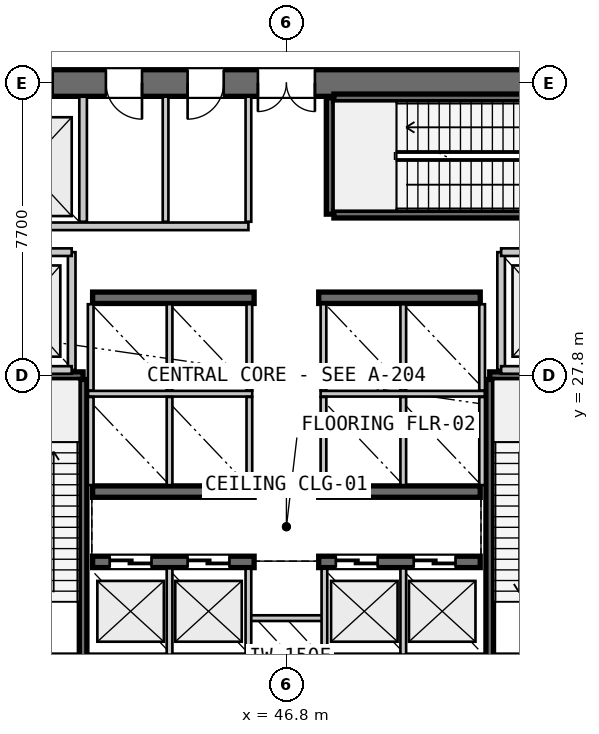
"""IFC4 building model, lengths in metres.
Left out: names, types, materials, properties, quantities, classifications, styles, units other than length and angle.
Written with IfcOpenShell. Run it as: python <this file> out.ifc"""

import sys

from ifc_helpers import new_model, si_unit, direction, frame, frame_2d, origin, place, context, subcontext, project, spatial, rectangle, extrude, source, transform, mapped, element, fill, save


model = new_model("IFC4")
c1 = context("Model", 3, precision=1e-05, world=origin(), true_north=direction((0.0, 1.0)))
c2 = subcontext(c1, "Body", "Model", "MODEL_VIEW")
j1 = project(units=[si_unit("LENGTHUNIT", "METRE"), si_unit("PLANEANGLEUNIT", "RADIAN")], contexts=[c1])
p1 = place(None, origin())
s1 = spatial("IfcSite", under=j1, at=p1, CompositionType="ELEMENT")
p2 = place(p1, origin())
s2 = spatial("IfcBuilding", under=s1, at=p2, CompositionType="ELEMENT")
p3 = place(p2, frame((0.0, 0.0, 24.0)))
s3 = spatial("IfcBuildingStorey", under=s2, at=p3, CompositionType="ELEMENT", Elevation=24.0)
p4 = place(p3, frame((38.0, 20.1, 0.0), z_axis=(0.0, 0.0, 1.0), x_axis=(1.0, 0.0, 0.0)))
e1 = element("IfcWall", 1, at=p4, inside=s3, PredefinedType="SHEAR", context=c2, shape_type="SweptSolid", body=[
    extrude(rectangle(XDim=17.6, YDim=0.7, at=frame_2d((8.8, 0.0))), origin(), (0.0, 0.0, 1.0), 5.12),
])
p5 = place(p4, frame((1.4, 0.0, 0.0)))
e2 = element("IfcOpeningElement", 2, at=p5, cuts=e1, PredefinedType="OPENING", context=c2, shape_type="SweptSolid", body=[
    extrude(rectangle(XDim=1.05, YDim=2.15, at=frame_2d((0.525, 1.075))), frame((0.0, 0.36, 0.0), z_axis=(0.0, -1.0, 0.0), x_axis=(1.0, 0.0, 0.0)), (0.0, 0.0, 1.0), 0.72),
])
p6 = place(p4, frame((15.15, 0.0, 0.0)))
e3 = element("IfcOpeningElement", 3, at=p6, cuts=e1, PredefinedType="OPENING", context=c2, shape_type="SweptSolid", body=[
    extrude(rectangle(XDim=1.05, YDim=2.15, at=frame_2d((0.525, 1.075))), frame((0.0, 0.36, 0.0), z_axis=(0.0, -1.0, 0.0), x_axis=(1.0, 0.0, 0.0)), (0.0, 0.0, 1.0), 0.72),
])
p7 = place(p3, frame((55.6, 35.5, 0.0), z_axis=(0.0, 0.0, 1.0), x_axis=(-1.0, 0.0, 0.0)))
e4 = element("IfcWall", 4, at=p7, inside=s3, PredefinedType="SHEAR", context=c2, shape_type="SweptSolid", body=[
    extrude(rectangle(XDim=17.6, YDim=0.7, at=frame_2d((8.8, 0.0))), origin(), (0.0, 0.0, 1.0), 5.12),
])
p8 = place(p7, frame((8.05, 0.0, 0.0)))
e5 = element("IfcOpeningElement", 5, at=p8, cuts=e4, PredefinedType="OPENING", context=c2, shape_type="SweptSolid", body=[
    extrude(rectangle(XDim=1.5, YDim=2.2, at=frame_2d((0.75, 1.1))), frame((0.0, 0.36, 0.0), z_axis=(0.0, -1.0, 0.0), x_axis=(1.0, 0.0, 0.0)), (0.0, 0.0, 1.0), 0.72),
])
p9 = place(p7, frame((14.95, 0.0, 0.0)))
e6 = element("IfcOpeningElement", 6, at=p9, cuts=e4, PredefinedType="OPENING", context=c2, shape_type="SweptSolid", body=[
    extrude(rectangle(XDim=1.4, YDim=2.3, at=frame_2d((0.7, 1.15))), frame((0.0, 0.36, 0.0), z_axis=(0.0, -1.0, 0.0), x_axis=(1.0, 0.0, 0.0)), (0.0, 0.0, 1.0), 0.72),
])
p10 = place(p7, frame((12.6, 0.0, 0.0)))
e7 = element("IfcOpeningElement", 7, at=p10, cuts=e4, PredefinedType="OPENING", context=c2, shape_type="SweptSolid", body=[
    extrude(rectangle(XDim=0.95, YDim=2.15, at=frame_2d((0.475, 1.075))), frame((0.0, 0.36, 0.0), z_axis=(0.0, -1.0, 0.0), x_axis=(1.0, 0.0, 0.0)), (0.0, 0.0, 1.0), 0.72),
])
p11 = place(p7, frame((10.45, 0.0, 0.0)))
e8 = element("IfcOpeningElement", 8, at=p11, cuts=e4, PredefinedType="OPENING", context=c2, shape_type="SweptSolid", body=[
    extrude(rectangle(XDim=0.95, YDim=2.15, at=frame_2d((0.475, 1.075))), frame((0.0, 0.36, 0.0), z_axis=(0.0, -1.0, 0.0), x_axis=(1.0, 0.0, 0.0)), (0.0, 0.0, 1.0), 0.72),
])
p12 = place(p3, frame((41.7, 22.9, 0.0), z_axis=(0.0, 0.0, 1.0), x_axis=(1.0, 0.0, 0.0)))
e9 = element("IfcWall", 9, at=p12, inside=s3, PredefinedType="SHEAR", context=c2, shape_type="SweptSolid", body=[
    extrude(rectangle(XDim=4.25, YDim=0.3, at=frame_2d((2.125, 0.0))), origin(), (0.0, 0.0, 1.0), 5.12),
])
p13 = place(p12, frame((0.45, 0.0, 0.0)))
e10 = element("IfcOpeningElement", 10, at=p13, cuts=e9, PredefinedType="OPENING", context=c2, shape_type="SweptSolid", body=[
    extrude(rectangle(XDim=1.1, YDim=2.2, at=frame_2d((0.55, 1.1))), frame((0.0, 0.16, 0.0), z_axis=(0.0, -1.0, 0.0), x_axis=(1.0, 0.0, 0.0)), (0.0, 0.0, 1.0), 0.32),
])
p14 = place(p12, frame((2.5, 0.0, 0.0)))
e11 = element("IfcOpeningElement", 11, at=p14, cuts=e9, PredefinedType="OPENING", context=c2, shape_type="SweptSolid", body=[
    extrude(rectangle(XDim=1.1, YDim=2.2, at=frame_2d((0.55, 1.1))), frame((0.0, 0.16, 0.0), z_axis=(0.0, -1.0, 0.0), x_axis=(1.0, 0.0, 0.0)), (0.0, 0.0, 1.0), 0.32),
])
p15 = place(p3, frame((47.65, 22.9, 0.0), z_axis=(0.0, 0.0, 1.0), x_axis=(1.0, 0.0, 0.0)))
e12 = element("IfcWall", 12, at=p15, inside=s3, PredefinedType="SHEAR", context=c2, shape_type="SweptSolid", body=[
    extrude(rectangle(XDim=4.25, YDim=0.3, at=frame_2d((2.125, 0.0))), origin(), (0.0, 0.0, 1.0), 5.12),
])
p16 = place(p15, frame((0.45, 0.0, 0.0)))
e13 = element("IfcOpeningElement", 13, at=p16, cuts=e12, PredefinedType="OPENING", context=c2, shape_type="SweptSolid", body=[
    extrude(rectangle(XDim=1.1, YDim=2.2, at=frame_2d((0.55, 1.1))), frame((0.0, 0.16, 0.0), z_axis=(0.0, -1.0, 0.0), x_axis=(1.0, 0.0, 0.0)), (0.0, 0.0, 1.0), 0.32),
])
p17 = place(p15, frame((2.5, 0.0, 0.0)))
e14 = element("IfcOpeningElement", 14, at=p17, cuts=e12, PredefinedType="OPENING", context=c2, shape_type="SweptSolid", body=[
    extrude(rectangle(XDim=1.1, YDim=2.2, at=frame_2d((0.55, 1.1))), frame((0.0, 0.16, 0.0), z_axis=(0.0, -1.0, 0.0), x_axis=(1.0, 0.0, 0.0)), (0.0, 0.0, 1.0), 0.32),
])
for number, where, z_axis, x_axis in (
    (15, (41.7, 24.75, 0.0), (0.0, 0.0, 1.0), (1.0, 0.0, 0.0)),
    (16, (47.65, 24.75, 0.0), (0.0, 0.0, 1.0), (1.0, 0.0, 0.0)),
    (17, (41.7, 29.85, 0.0), (0.0, 0.0, 1.0), (1.0, 0.0, 0.0)),
    (18, (47.65, 29.85, 0.0), (0.0, 0.0, 1.0), (1.0, 0.0, 0.0)),
):
    element("IfcWall", number, at=place(p3, frame(where, z_axis=z_axis, x_axis=x_axis)), inside=s3, PredefinedType="SHEAR", context=c2, shape_type="SweptSolid", body=[
        extrude(rectangle(XDim=4.25, YDim=0.3, at=frame_2d((2.125, 0.0))), origin(), (0.0, 0.0, 1.0), 5.12),
    ])
p18 = place(p3, frame((38.39, 27.8, 0.0), z_axis=(0.0, 0.0, 1.0), x_axis=(1.0, 0.0, 0.0)))
e19 = element("IfcWall", 19, at=p18, inside=s3, PredefinedType="SHEAR", context=c2, shape_type="SweptSolid", body=[
    extrude(rectangle(XDim=3.06, YDim=0.2, at=frame_2d((1.53, 0.0))), origin(), (0.0, 0.0, 1.0), 5.12),
])
p19 = place(p3, frame((41.45, 27.7, 0.0), z_axis=(0.0, 0.0, 1.0), x_axis=(0.0, -1.0, 0.0)))
e20 = element("IfcWall", 20, at=p19, inside=s3, PredefinedType="SHEAR", context=c2, shape_type="SweptSolid", body=[
    extrude(rectangle(XDim=7.35, YDim=0.2, at=frame_2d((3.675, 0.0))), origin(), (0.0, 0.0, 1.0), 5.12),
])
p20 = place(p3, frame((52.15, 27.8, 0.0), z_axis=(0.0, 0.0, 1.0), x_axis=(1.0, 0.0, 0.0)))
e21 = element("IfcWall", 21, at=p20, inside=s3, PredefinedType="SHEAR", context=c2, shape_type="SweptSolid", body=[
    extrude(rectangle(XDim=3.06, YDim=0.2, at=frame_2d((1.53, 0.0))), origin(), (0.0, 0.0, 1.0), 5.12),
])
p21 = place(p3, frame((52.15, 20.35, 0.0), z_axis=(0.0, 0.0, 1.0), x_axis=(0.0, 1.0, 0.0)))
e22 = element("IfcWall", 22, at=p21, inside=s3, PredefinedType="SHEAR", context=c2, shape_type="SweptSolid", body=[
    extrude(rectangle(XDim=7.35, YDim=0.2, at=frame_2d((3.675, 0.0))), origin(), (0.0, 0.0, 1.0), 5.12),
])
p22 = place(p3, frame((47.95, 32.05, 0.0), z_axis=(0.0, 0.0, 1.0), x_axis=(0.0, 1.0, 0.0)))
e23 = element("IfcWall", 23, at=p22, inside=s3, PredefinedType="SHEAR", context=c2, shape_type="SweptSolid", body=[
    extrude(rectangle(XDim=3.06, YDim=0.2, at=frame_2d((1.53, 0.0))), origin(), (0.0, 0.0, 1.0), 5.12),
])
for number, where, z_axis, x_axis in (
    (24, (48.05, 35.11, 0.0), (0.0, 0.0, 1.0), (1.0, 0.0, 0.0)),
    (25, (55.4, 32.05, 0.0), (0.0, 0.0, 1.0), (-1.0, 0.0, 0.0)),
):
    element("IfcWall", number, at=place(p3, frame(where, z_axis=z_axis, x_axis=x_axis)), inside=s3, PredefinedType="SHEAR", context=c2, shape_type="SweptSolid", body=[
        extrude(rectangle(XDim=7.35, YDim=0.2, at=frame_2d((3.675, 0.0))), origin(), (0.0, 0.0, 1.0), 5.12),
    ])
p23 = place(p3, frame((45.8, 21.42, 0.0), z_axis=(0.0, 0.0, 1.0), x_axis=(1.0, 0.0, 0.0)))
e26 = element("IfcWall", 26, at=p23, inside=s3, PredefinedType="PARTITIONING", context=c2, shape_type="SweptSolid", body=[
    extrude(rectangle(XDim=2.0, YDim=0.15, at=frame_2d((1.0, 0.0))), origin(), (0.0, 0.0, 1.0), 2.295),
])
for number, where, z_axis, x_axis in (
    (27, (45.8, 20.48, 0.0), (0.0, 0.0, 1.0), (0.0, 1.0, 0.0)),
    (28, (47.8, 20.48, 0.0), (0.0, 0.0, 1.0), (0.0, 1.0, 0.0)),
):
    element("IfcWall", number, at=place(p3, frame(where, z_axis=z_axis, x_axis=x_axis)), inside=s3, PredefinedType="PARTITIONING", context=c2, shape_type="SweptSolid", body=[
        extrude(rectangle(XDim=2.24, YDim=0.15, at=frame_2d((1.12, 0.0))), origin(), (0.0, 0.0, 1.0), 2.295),
    ])
p24 = place(p3, frame((41.15, 27.95, 0.0), z_axis=(0.0, 0.0, 1.0), x_axis=(0.0, 1.0, 0.0)))
e29 = element("IfcWall", 29, at=p24, inside=s3, PredefinedType="PARTITIONING", context=c2, shape_type="SweptSolid", body=[
    extrude(rectangle(XDim=3.1, YDim=0.2, at=frame_2d((1.55, 0.0))), origin(), (0.0, 0.0, 1.0), 2.295),
])
for number, where, z_axis, x_axis in (
    (30, (38.36, 27.95, 0.0), (0.0, 0.0, 1.0), (1.0, 0.0, 0.0)),
    (31, (38.36, 31.05, 0.0), (0.0, 0.0, 1.0), (1.0, 0.0, 0.0)),
):
    element("IfcWall", number, at=place(p3, frame(where, z_axis=z_axis, x_axis=x_axis)), inside=s3, PredefinedType="PARTITIONING", context=c2, shape_type="SweptSolid", body=[
        extrude(rectangle(XDim=2.79, YDim=0.2, at=frame_2d((1.395, 0.0))), origin(), (0.0, 0.0, 1.0), 2.295),
    ])
p25 = place(p3, frame((52.45, 27.95, 0.0), z_axis=(0.0, 0.0, 1.0), x_axis=(0.0, 1.0, 0.0)))
e32 = element("IfcWall", 32, at=p25, inside=s3, PredefinedType="PARTITIONING", context=c2, shape_type="SweptSolid", body=[
    extrude(rectangle(XDim=3.1, YDim=0.2, at=frame_2d((1.55, 0.0))), origin(), (0.0, 0.0, 1.0), 2.295),
])
for number, where, z_axis, x_axis in (
    (33, (52.45, 27.95, 0.0), (0.0, 0.0, 1.0), (1.0, 0.0, 0.0)),
    (34, (52.45, 31.05, 0.0), (0.0, 0.0, 1.0), (1.0, 0.0, 0.0)),
):
    element("IfcWall", number, at=place(p3, frame(where, z_axis=z_axis, x_axis=x_axis)), inside=s3, PredefinedType="PARTITIONING", context=c2, shape_type="SweptSolid", body=[
        extrude(rectangle(XDim=2.79, YDim=0.2, at=frame_2d((1.395, 0.0))), origin(), (0.0, 0.0, 1.0), 2.295),
    ])
for number, where, z_axis, x_axis in (
    (35, (43.725, 20.46, 0.0), (0.0, 0.0, 1.0), (0.0, 1.0, 0.0)),
    (36, (49.875, 20.46, 0.0), (0.0, 0.0, 1.0), (0.0, 1.0, 0.0)),
):
    element("IfcWall", number, at=place(p3, frame(where, z_axis=z_axis, x_axis=x_axis)), inside=s3, PredefinedType="PARTITIONING", context=c2, shape_type="SweptSolid", body=[
        extrude(rectangle(XDim=2.27, YDim=0.15, at=frame_2d((1.135, 0.0))), origin(), (0.0, 0.0, 1.0), 2.295),
    ])
p26 = place(p3, frame((41.58, 27.325, 0.0), z_axis=(0.0, 0.0, 1.0), x_axis=(1.0, 0.0, 0.0)))
e37 = element("IfcWall", 37, at=p26, inside=s3, PredefinedType="PARTITIONING", context=c2, shape_type="SweptSolid", body=[
    extrude(rectangle(XDim=4.32, YDim=0.15, at=frame_2d((2.16, 0.0))), origin(), (0.0, 0.0, 1.0), 2.295),
])
p27 = place(p3, frame((47.7, 27.325, 0.0), z_axis=(0.0, 0.0, 1.0), x_axis=(1.0, 0.0, 0.0)))
e38 = element("IfcWall", 38, at=p27, inside=s3, PredefinedType="PARTITIONING", context=c2, shape_type="SweptSolid", body=[
    extrude(rectangle(XDim=4.32, YDim=0.15, at=frame_2d((2.16, 0.0))), origin(), (0.0, 0.0, 1.0), 2.295),
])
for number, where, z_axis, x_axis in (
    (39, (41.65, 24.92, 0.0), (0.0, 0.0, 1.0), (0.0, 1.0, 0.0)),
    (40, (43.725, 24.92, 0.0), (0.0, 0.0, 1.0), (0.0, 1.0, 0.0)),
    (41, (45.825, 24.92, 0.0), (0.0, 0.0, 1.0), (0.0, 1.0, 0.0)),
    (42, (47.775, 24.92, 0.0), (0.0, 0.0, 1.0), (0.0, 1.0, 0.0)),
    (43, (49.875, 24.92, 0.0), (0.0, 0.0, 1.0), (0.0, 1.0, 0.0)),
    (44, (51.95, 24.92, 0.0), (0.0, 0.0, 1.0), (0.0, 1.0, 0.0)),
):
    element("IfcWall", number, at=place(p3, frame(where, z_axis=z_axis, x_axis=x_axis)), inside=s3, PredefinedType="PARTITIONING", context=c2, shape_type="SweptSolid", body=[
        extrude(rectangle(XDim=2.32, YDim=0.15, at=frame_2d((1.16, 0.0))), origin(), (0.0, 0.0, 1.0), 2.295),
    ])
for number, where, z_axis, x_axis in (
    (45, (41.65, 27.41, 0.0), (0.0, 0.0, 1.0), (0.0, 1.0, 0.0)),
    (46, (43.725, 27.41, 0.0), (0.0, 0.0, 1.0), (0.0, 1.0, 0.0)),
    (47, (45.825, 27.41, 0.0), (0.0, 0.0, 1.0), (0.0, 1.0, 0.0)),
    (48, (47.775, 27.41, 0.0), (0.0, 0.0, 1.0), (0.0, 1.0, 0.0)),
    (49, (49.875, 27.41, 0.0), (0.0, 0.0, 1.0), (0.0, 1.0, 0.0)),
    (50, (51.95, 27.41, 0.0), (0.0, 0.0, 1.0), (0.0, 1.0, 0.0)),
):
    element("IfcWall", number, at=place(p3, frame(where, z_axis=z_axis, x_axis=x_axis)), inside=s3, PredefinedType="PARTITIONING", context=c2, shape_type="SweptSolid", body=[
        extrude(rectangle(XDim=2.27, YDim=0.15, at=frame_2d((1.135, 0.0))), origin(), (0.0, 0.0, 1.0), 2.295),
    ])
p28 = place(p3, frame((41.45, 31.85, 0.0), z_axis=(0.0, 0.0, 1.0), x_axis=(0.0, 1.0, 0.0)))
e51 = element("IfcWall", 51, at=p28, inside=s3, PredefinedType="PARTITIONING", context=c2, shape_type="SweptSolid", body=[
    extrude(rectangle(XDim=3.29, YDim=0.2, at=frame_2d((1.645, 0.0))), origin(), (0.0, 0.0, 1.0), 2.295),
])
p29 = place(p3, frame((38.36, 31.73, 0.0), z_axis=(0.0, 0.0, 1.0), x_axis=(1.0, 0.0, 0.0)))
e52 = element("IfcWall", 52, at=p29, inside=s3, PredefinedType="PARTITIONING", context=c2, shape_type="SweptSolid", body=[
    extrude(rectangle(XDim=7.44, YDim=0.2, at=frame_2d((3.72, 0.0))), origin(), (0.0, 0.0, 1.0), 2.295),
])
p30 = place(p3, frame((45.8, 31.85, 0.0), z_axis=(0.0, 0.0, 1.0), x_axis=(0.0, 1.0, 0.0)))
e53 = element("IfcWall", 53, at=p30, inside=s3, PredefinedType="PARTITIONING", context=c2, shape_type="SweptSolid", body=[
    extrude(rectangle(XDim=3.29, YDim=0.15, at=frame_2d((1.645, 0.0))), origin(), (0.0, 0.0, 1.0), 2.295),
])
p31 = place(p3, frame((43.62, 31.85, 0.0), z_axis=(0.0, 0.0, 1.0), x_axis=(0.0, 1.0, 0.0)))
e54 = element("IfcWall", 54, at=p31, inside=s3, PredefinedType="PLUMBINGWALL", context=c2, shape_type="SweptSolid", body=[
    extrude(rectangle(XDim=3.29, YDim=0.15, at=frame_2d((1.645, 0.0))), origin(), (0.0, 0.0, 1.0), 2.295),
])
m1 = source(origin(), c2, "Body", "SweptSolid", [
    extrude(rectangle(XDim=1.5, YDim=2.2, at=frame_2d((0.75, 1.1))), frame((0.0, 0.025, 0.0), z_axis=(0.0, -1.0, 0.0), x_axis=(1.0, 0.0, 0.0)), (0.0, 0.0, 1.0), 0.05),
])
p32 = place(p8, origin())
e55 = element("IfcDoor", 55, at=p32, inside=s3, OperationType="DOUBLE_DOOR_SINGLE_SWING", PredefinedType="DOOR", context=c2, shape_type="MappedRepresentation", body=[
    mapped(m1, transform((0.0, 0.0, 0.0), scale=1.0)),
])
fill(e5, e55)
m2 = source(origin(), c2, "Body", "SweptSolid", [
    extrude(rectangle(XDim=1.1, YDim=2.2, at=frame_2d((0.55, 1.1))), frame((0.0, 0.025, 0.0), z_axis=(0.0, -1.0, 0.0), x_axis=(1.0, 0.0, 0.0)), (0.0, 0.0, 1.0), 0.05),
])
p33 = place(p13, origin())
e56 = element("IfcDoor", 56, at=p33, inside=s3, OperationType="SLIDING_TO_LEFT", PredefinedType="DOOR", context=c2, shape_type="MappedRepresentation", body=[
    mapped(m2, transform((0.0, 0.0, 0.0), scale=1.0)),
])
fill(e10, e56)
p34 = place(p14, origin())
e57 = element("IfcDoor", 57, at=p34, inside=s3, OperationType="SLIDING_TO_LEFT", PredefinedType="DOOR", context=c2, shape_type="MappedRepresentation", body=[
    mapped(m2, transform((0.0, 0.0, 0.0), scale=1.0)),
])
fill(e11, e57)
p35 = place(p16, origin())
e58 = element("IfcDoor", 58, at=p35, inside=s3, OperationType="SLIDING_TO_LEFT", PredefinedType="DOOR", context=c2, shape_type="MappedRepresentation", body=[
    mapped(m2, transform((0.0, 0.0, 0.0), scale=1.0)),
])
fill(e13, e58)
p36 = place(p17, origin())
e59 = element("IfcDoor", 59, at=p36, inside=s3, OperationType="SLIDING_TO_LEFT", PredefinedType="DOOR", context=c2, shape_type="MappedRepresentation", body=[
    mapped(m2, transform((0.0, 0.0, 0.0), scale=1.0)),
])
fill(e14, e59)
m3 = source(origin(), c2, "Body", "SweptSolid", [
    extrude(rectangle(XDim=1.4, YDim=2.3, at=frame_2d((0.7, 1.15))), frame((0.0, 0.025, 0.0), z_axis=(0.0, -1.0, 0.0), x_axis=(1.0, 0.0, 0.0)), (0.0, 0.0, 1.0), 0.05),
])
p37 = place(p9, origin())
e60 = element("IfcDoor", 60, at=p37, inside=s3, OperationType="SLIDING_TO_RIGHT", PredefinedType="DOOR", context=c2, shape_type="MappedRepresentation", body=[
    mapped(m3, transform((0.0, 0.0, 0.0), scale=1.0)),
])
fill(e6, e60)
m4 = source(origin(), c2, "Body", "SweptSolid", [
    extrude(rectangle(XDim=0.95, YDim=2.15, at=frame_2d((0.475, 1.075))), frame((0.0, 0.025, 0.0), z_axis=(0.0, -1.0, 0.0), x_axis=(1.0, 0.0, 0.0)), (0.0, 0.0, 1.0), 0.05),
])
p38 = place(p10, origin())
e61 = element("IfcDoor", 61, at=p38, inside=s3, OperationType="SINGLE_SWING_LEFT", PredefinedType="DOOR", context=c2, shape_type="MappedRepresentation", body=[
    mapped(m4, transform((0.0, 0.0, 0.0), scale=1.0)),
])
fill(e7, e61)
p39 = place(p11, origin())
e62 = element("IfcDoor", 62, at=p39, inside=s3, OperationType="SINGLE_SWING_RIGHT", PredefinedType="DOOR", context=c2, shape_type="MappedRepresentation", body=[
    mapped(m4, transform((0.0, 0.0, 0.0), scale=1.0)),
])
fill(e8, e62)
save(model, sys.argv[1])
